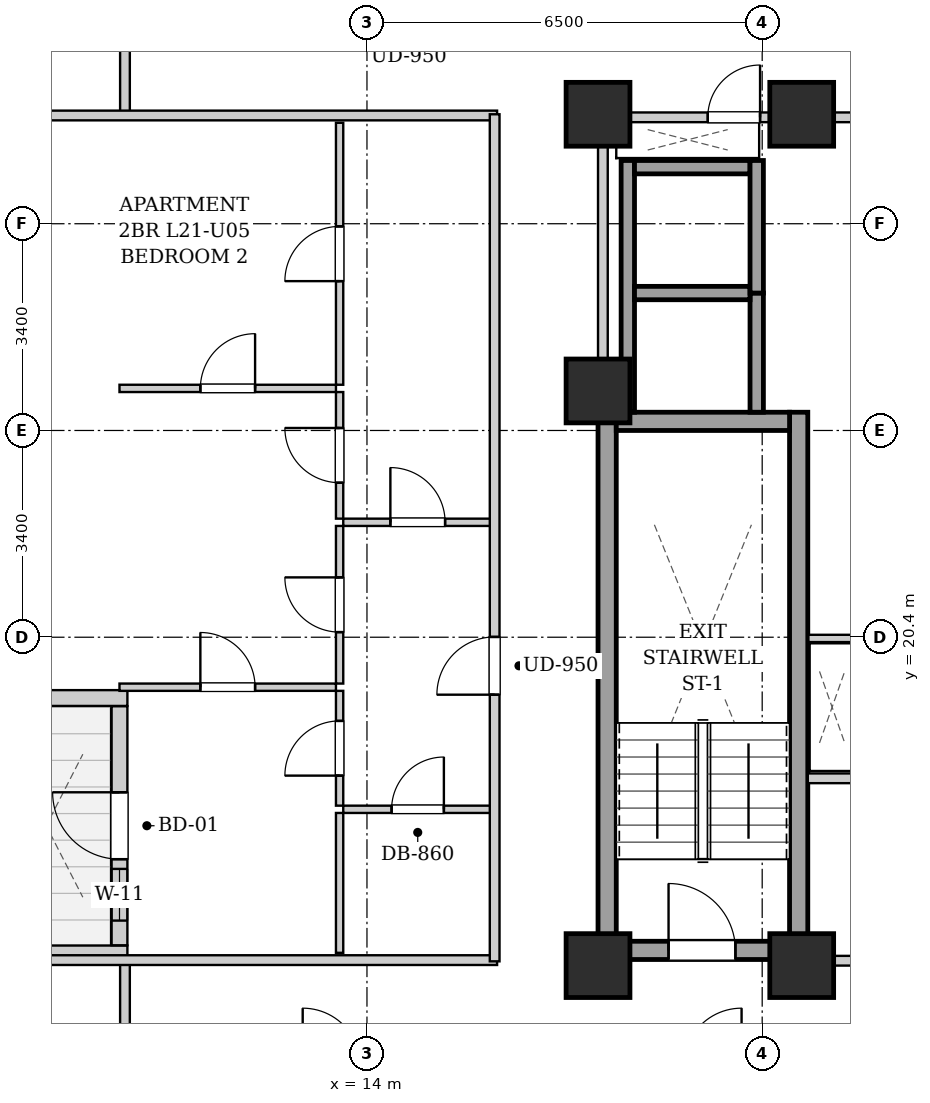
"""IFC4 building model, lengths in metres.
Left out: names, types, materials, properties, quantities, classifications, styles, units other than length and angle.
Written with IfcOpenShell. Run it as: python <this file> out.ifc"""

import sys

from ifc_helpers import new_model, si_unit, direction, frame, frame_2d, origin, origin_2d, place, context, subcontext, project, spatial, rectangle, extrude, element, fill, save


model = new_model("IFC4")
c1 = context("Model", 3, precision=1e-05, world=origin(), true_north=direction((0.0, 1.0)))
c2 = subcontext(c1, "Body", "Model", "MODEL_VIEW")
j1 = project(units=[si_unit("LENGTHUNIT", "METRE"), si_unit("PLANEANGLEUNIT", "RADIAN")], contexts=[c1])
p1 = place(None, origin())
s1 = spatial("IfcSite", under=j1, at=p1, CompositionType="ELEMENT")
p2 = place(p1, origin())
s2 = spatial("IfcBuilding", under=s1, at=p2, CompositionType="ELEMENT")
p3 = place(p2, frame((0.0, 0.0, 78.3)))
s3 = spatial("IfcBuildingStorey", under=s2, at=p3, CompositionType="ELEMENT", Elevation=78.3)
for number, where, z_axis, x_axis in (
    (1, (17.8, 15.0, 0.0), (0.0, 0.0, 1.0), (1.0, 0.0, 0.0)),
    (2, (21.15, 15.0, 0.0), (0.0, 0.0, 1.0), (1.0, 0.0, 0.0)),
    (3, (17.8, 29.0, 0.0), (0.0, 0.0, 1.0), (1.0, 0.0, 0.0)),
    (4, (21.15, 29.0, 0.0), (0.0, 0.0, 1.0), (1.0, 0.0, 0.0)),
    (5, (17.8, 24.45, 0.0), (0.0, 0.0, 1.0), (1.0, 0.0, 0.0)),
):
    element("IfcColumn", number, at=place(p3, frame(where, z_axis=z_axis, x_axis=x_axis)), inside=s3, PredefinedType="COLUMN", context=c2, shape_type="SweptSolid", body=[
        extrude(rectangle(XDim=1.05, YDim=1.05, at=origin_2d()), origin(), (0.0, 0.0, 1.0), 3.2),
    ])
p4 = place(p3, frame((7.66, 15.2, 0.0), z_axis=(0.0, 0.0, 1.0), x_axis=(1.0, 0.0, 0.0)))
e6 = element("IfcWall", 6, at=p4, inside=s3, PredefinedType="SOLIDWALL", context=c2, shape_type="SweptSolid", body=[
    extrude(rectangle(XDim=2.4, YDim=0.26, at=frame_2d((1.2, 0.0))), origin(), (0.0, 0.0, 1.0), 2.94),
])
p5 = place(p3, frame((9.93, 15.334, 0.0), z_axis=(0.0, 0.0, 1.0), x_axis=(0.0, 1.0, 0.0)))
e7 = element("IfcWall", 7, at=p5, inside=s3, PredefinedType="SOLIDWALL", context=c2, shape_type="SweptSolid", body=[
    extrude(rectangle(XDim=3.932, YDim=0.26, at=frame_2d((1.966, 0.0))), origin(), (0.0, 0.0, 1.0), 2.94),
])
p6 = place(p5, frame((1.416, 0.0, 0.0)))
e8 = element("IfcOpeningElement", 8, at=p6, cuts=e7, PredefinedType="OPENING", context=c2, shape_type="SweptSolid", body=[
    extrude(rectangle(XDim=1.1, YDim=2.0, at=frame_2d((0.55, 1.0))), frame((0.0, 0.14, 0.0), z_axis=(0.0, -1.0, 0.0), x_axis=(1.0, 0.0, 0.0)), (0.0, 0.0, 1.0), 0.28),
])
p7 = place(p5, frame((0.406, 0.0, 0.55)))
e9 = element("IfcOpeningElement", 9, at=p7, cuts=e7, PredefinedType="OPENING", context=c2, shape_type="SweptSolid", body=[
    extrude(rectangle(XDim=0.85, YDim=1.2, at=frame_2d((0.425, 0.6))), frame((0.0, 0.14, 0.0), z_axis=(0.0, -1.0, 0.0), x_axis=(1.0, 0.0, 0.0)), (0.0, 0.0, 1.0), 0.28),
])
p8 = place(p3, frame((10.06, 19.4, 0.0), z_axis=(0.0, 0.0, 1.0), x_axis=(-1.0, 0.0, 0.0)))
e10 = element("IfcWall", 10, at=p8, inside=s3, PredefinedType="SOLIDWALL", context=c2, shape_type="SweptSolid", body=[
    extrude(rectangle(XDim=2.4, YDim=0.26, at=frame_2d((1.2, 0.0))), origin(), (0.0, 0.0, 1.0), 2.94),
])
for number, where, z_axis, x_axis in (
    (11, (17.95, 15.1, 0.0), (0.0, 0.0, 1.0), (0.0, 1.0, 0.0)),
    (12, (21.1, 15.1, 0.0), (0.0, 0.0, 1.0), (0.0, 1.0, 0.0)),
):
    element("IfcWall", number, at=place(p3, frame(where, z_axis=z_axis, x_axis=x_axis)), inside=s3, PredefinedType="SHEAR", context=c2, shape_type="SweptSolid", body=[
        extrude(rectangle(XDim=9.0, YDim=0.3, at=frame_2d((4.5, 0.0))), origin(), (0.0, 0.0, 1.0), 2.94),
    ])
p9 = place(p3, frame((18.1, 23.95, 0.0), z_axis=(0.0, 0.0, 1.0), x_axis=(1.0, 0.0, 0.0)))
e13 = element("IfcWall", 13, at=p9, inside=s3, PredefinedType="SHEAR", context=c2, shape_type="SweptSolid", body=[
    extrude(rectangle(XDim=2.85, YDim=0.3, at=frame_2d((1.425, 0.0))), origin(), (0.0, 0.0, 1.0), 2.94),
])
p10 = place(p3, frame((18.1, 15.25, 0.0), z_axis=(0.0, 0.0, 1.0), x_axis=(1.0, 0.0, 0.0)))
e14 = element("IfcWall", 14, at=p10, inside=s3, PredefinedType="SHEAR", context=c2, shape_type="SweptSolid", body=[
    extrude(rectangle(XDim=2.85, YDim=0.3, at=frame_2d((1.425, 0.0))), origin(), (0.0, 0.0, 1.0), 2.94),
])
p11 = place(p10, frame((0.86, 0.0, 0.0)))
e15 = element("IfcOpeningElement", 15, at=p11, cuts=e14, PredefinedType="OPENING", context=c2, shape_type="SweptSolid", body=[
    extrude(rectangle(XDim=1.1, YDim=2.05, at=frame_2d((0.55, 1.025))), frame((0.0, 0.16, 0.0), z_axis=(0.0, -1.0, 0.0), x_axis=(1.0, 0.0, 0.0)), (0.0, 0.0, 1.0), 0.32),
])
p12 = place(p3, frame((18.29, 24.1, 0.0), z_axis=(0.0, 0.0, 1.0), x_axis=(0.0, 1.0, 0.0)))
e16 = element("IfcWall", 16, at=p12, inside=s3, PredefinedType="SHEAR", context=c2, shape_type="SweptSolid", body=[
    extrude(rectangle(XDim=4.14, YDim=0.22, at=frame_2d((2.07, 0.0))), origin(), (0.0, 0.0, 1.0), 2.94),
])
p13 = place(p3, frame((20.41, 24.1, 0.0), z_axis=(0.0, 0.0, 1.0), x_axis=(0.0, 1.0, 0.0)))
e17 = element("IfcWall", 17, at=p13, inside=s3, PredefinedType="SHEAR", context=c2, shape_type="SweptSolid", body=[
    extrude(rectangle(XDim=1.96, YDim=0.22, at=frame_2d((0.98, 0.0))), origin(), (0.0, 0.0, 1.0), 2.94),
])
for number, where, z_axis, x_axis in (
    (18, (18.4, 26.06, 0.0), (0.0, 0.0, 1.0), (1.0, 0.0, 0.0)),
    (19, (18.4, 28.13, 0.0), (0.0, 0.0, 1.0), (1.0, 0.0, 0.0)),
):
    element("IfcWall", number, at=place(p3, frame(where, z_axis=z_axis, x_axis=x_axis)), inside=s3, PredefinedType="SHEAR", context=c2, shape_type="SweptSolid", body=[
        extrude(rectangle(XDim=1.9, YDim=0.22, at=frame_2d((0.95, 0.0))), origin(), (0.0, 0.0, 1.0), 2.94),
    ])
p14 = place(p3, frame((20.41, 26.06, 0.0), z_axis=(0.0, 0.0, 1.0), x_axis=(0.0, 1.0, 0.0)))
e20 = element("IfcWall", 20, at=p14, inside=s3, PredefinedType="SHEAR", context=c2, shape_type="SweptSolid", body=[
    extrude(rectangle(XDim=2.18, YDim=0.22, at=frame_2d((1.09, 0.0))), origin(), (0.0, 0.0, 1.0), 2.94),
])
p15 = place(p3, frame((21.25, 15.08, 0.0), z_axis=(0.0, 0.0, 1.0), x_axis=(1.0, 0.0, 0.0)))
e21 = element("IfcWall", 21, at=p15, inside=s3, PredefinedType="PARTITIONING", context=c2, shape_type="SweptSolid", body=[
    extrude(rectangle(XDim=8.5, YDim=0.16, at=frame_2d((4.25, 0.0))), origin(), (0.0, 0.0, 1.0), 2.309),
])
p16 = place(p15, frame((3.725, 0.0, 0.0)))
e22 = element("IfcOpeningElement", 22, at=p16, cuts=e21, PredefinedType="OPENING", context=c2, shape_type="SweptSolid", body=[
    extrude(rectangle(XDim=1.05, YDim=2.05, at=frame_2d((0.525, 1.025))), frame((0.0, 0.09, 0.0), z_axis=(0.0, -1.0, 0.0), x_axis=(1.0, 0.0, 0.0)), (0.0, 0.0, 1.0), 0.18),
])
p17 = place(p3, frame((21.25, 18.08, 0.0), z_axis=(0.0, 0.0, 1.0), x_axis=(1.0, 0.0, 0.0)))
e23 = element("IfcWall", 23, at=p17, inside=s3, PredefinedType="PARTITIONING", context=c2, shape_type="SweptSolid", body=[
    extrude(rectangle(XDim=1.1, YDim=0.16, at=frame_2d((0.55, 0.0))), origin(), (0.0, 0.0, 1.0), 2.94),
])
p18 = place(p3, frame((17.88, 24.12, 0.0), z_axis=(0.0, 0.0, 1.0), x_axis=(0.0, 1.0, 0.0)))
e24 = element("IfcWall", 24, at=p18, inside=s3, PredefinedType="PARTITIONING", context=c2, shape_type="SweptSolid", body=[
    extrude(rectangle(XDim=4.76, YDim=0.16, at=frame_2d((2.38, 0.0))), origin(), (0.0, 0.0, 1.0), 2.275),
])
p19 = place(p3, frame((17.96, 28.95, 0.0), z_axis=(0.0, 0.0, 1.0), x_axis=(1.0, 0.0, 0.0)))
e25 = element("IfcWall", 25, at=p19, inside=s3, PredefinedType="PARTITIONING", context=c2, shape_type="SweptSolid", body=[
    extrude(rectangle(XDim=4.29, YDim=0.16, at=frame_2d((2.145, 0.0))), origin(), (0.0, 0.0, 1.0), 2.309),
])
p20 = place(p19, frame((1.645, 0.0, 0.0)))
e26 = element("IfcOpeningElement", 26, at=p20, cuts=e25, PredefinedType="OPENING", context=c2, shape_type="SweptSolid", body=[
    extrude(rectangle(XDim=0.86, YDim=2.05, at=frame_2d((0.43, 1.025))), frame((0.0, 0.09, 0.0), z_axis=(0.0, -1.0, 0.0), x_axis=(1.0, 0.0, 0.0)), (0.0, 0.0, 1.0), 0.18),
])
p21 = place(p3, frame((22.28, 20.38, 0.0), z_axis=(0.0, 0.0, 1.0), x_axis=(-1.0, 0.0, 0.0)))
e27 = element("IfcWall", 27, at=p21, inside=s3, PredefinedType="PARTITIONING", context=c2, shape_type="SweptSolid", body=[
    extrude(rectangle(XDim=1.02, YDim=0.12, at=frame_2d((0.51, 0.0))), origin(), (0.0, 0.0, 1.0), 2.94),
])
for number, where, z_axis, x_axis in (
    (28, (10.02, 13.35, 0.0), (0.0, 0.0, 1.0), (0.0, 1.0, 0.0)),
    (29, (10.02, 28.98, 0.0), (0.0, 0.0, 1.0), (0.0, 1.0, 0.0)),
):
    element("IfcWall", number, at=place(p3, frame(where, z_axis=z_axis, x_axis=x_axis)), inside=s3, PredefinedType="PARTITIONING", context=c2, shape_type="SweptSolid", body=[
        extrude(rectangle(XDim=1.74, YDim=0.16, at=frame_2d((0.87, 0.0))), origin(), (0.0, 0.0, 1.0), 2.94),
    ])
for number, where, z_axis, x_axis in (
    (30, (7.78, 15.09, 0.0), (0.0, 0.0, 1.0), (1.0, 0.0, 0.0)),
    (31, (7.78, 28.98, 0.0), (0.0, 0.0, 1.0), (1.0, 0.0, 0.0)),
):
    element("IfcWall", number, at=place(p3, frame(where, z_axis=z_axis, x_axis=x_axis)), inside=s3, PredefinedType="PARTITIONING", context=c2, shape_type="SweptSolid", body=[
        extrude(rectangle(XDim=8.36, YDim=0.16, at=frame_2d((4.18, 0.0))), origin(), (0.0, 0.0, 1.0), 2.309),
    ])
p22 = place(p3, frame((13.61, 22.29, 0.0), z_axis=(0.0, 0.0, 1.0), x_axis=(1.0, 0.0, 0.0)))
e32 = element("IfcWall", 32, at=p22, inside=s3, PredefinedType="PARTITIONING", context=c2, shape_type="SweptSolid", body=[
    extrude(rectangle(XDim=2.45, YDim=0.12, at=frame_2d((1.225, 0.0))), origin(), (0.0, 0.0, 1.0), 2.94),
])
p23 = place(p22, frame((0.775, 0.0, 0.0)))
e33 = element("IfcOpeningElement", 33, at=p23, cuts=e32, PredefinedType="OPENING", context=c2, shape_type="SweptSolid", body=[
    extrude(rectangle(XDim=0.9, YDim=2.05, at=frame_2d((0.45, 1.025))), frame((0.0, 0.07, 0.0), z_axis=(0.0, -1.0, 0.0), x_axis=(1.0, 0.0, 0.0)), (0.0, 0.0, 1.0), 0.14),
])
p24 = place(p3, frame((13.55, 22.35, 0.0), z_axis=(0.0, 0.0, 1.0), x_axis=(0.0, 1.0, 0.0)))
e34 = element("IfcWall", 34, at=p24, inside=s3, PredefinedType="PARTITIONING", context=c2, shape_type="SweptSolid", body=[
    extrude(rectangle(XDim=2.082, YDim=0.12, at=frame_2d((1.041, 0.0))), origin(), (0.0, 0.0, 1.0), 2.94),
])
p25 = place(p24, frame((0.591, 0.0, 0.0)))
e35 = element("IfcOpeningElement", 35, at=p25, cuts=e34, PredefinedType="OPENING", context=c2, shape_type="SweptSolid", body=[
    extrude(rectangle(XDim=0.9, YDim=2.05, at=frame_2d((0.45, 1.025))), frame((0.0, 0.07, 0.0), z_axis=(0.0, -1.0, 0.0), x_axis=(1.0, 0.0, 0.0)), (0.0, 0.0, 1.0), 0.14),
])
p26 = place(p3, frame((13.55, 24.552, 0.0), z_axis=(0.0, 0.0, 1.0), x_axis=(0.0, 1.0, 0.0)))
e36 = element("IfcWall", 36, at=p26, inside=s3, PredefinedType="PARTITIONING", context=c2, shape_type="SweptSolid", body=[
    extrude(rectangle(XDim=4.308, YDim=0.12, at=frame_2d((2.154, 0.0))), origin(), (0.0, 0.0, 1.0), 2.94),
])
p27 = place(p26, frame((1.704, 0.0, 0.0)))
e37 = element("IfcOpeningElement", 37, at=p27, cuts=e36, PredefinedType="OPENING", context=c2, shape_type="SweptSolid", body=[
    extrude(rectangle(XDim=0.9, YDim=2.05, at=frame_2d((0.45, 1.025))), frame((0.0, 0.07, 0.0), z_axis=(0.0, -1.0, 0.0), x_axis=(1.0, 0.0, 0.0)), (0.0, 0.0, 1.0), 0.14),
])
p28 = place(p3, frame((13.61, 17.57, 0.0), z_axis=(0.0, 0.0, 1.0), x_axis=(1.0, 0.0, 0.0)))
e38 = element("IfcWall", 38, at=p28, inside=s3, PredefinedType="PARTITIONING", context=c2, shape_type="SweptSolid", body=[
    extrude(rectangle(XDim=2.45, YDim=0.12, at=frame_2d((1.225, 0.0))), origin(), (0.0, 0.0, 1.0), 2.94),
])
p29 = place(p28, frame((0.795, 0.0, 0.0)))
e39 = element("IfcOpeningElement", 39, at=p29, cuts=e38, PredefinedType="OPENING", context=c2, shape_type="SweptSolid", body=[
    extrude(rectangle(XDim=0.86, YDim=2.05, at=frame_2d((0.43, 1.025))), frame((0.0, 0.07, 0.0), z_axis=(0.0, -1.0, 0.0), x_axis=(1.0, 0.0, 0.0)), (0.0, 0.0, 1.0), 0.14),
])
p30 = place(p3, frame((13.55, 15.21, 0.0), z_axis=(0.0, 0.0, 1.0), x_axis=(0.0, 1.0, 0.0)))
e40 = element("IfcWall", 40, at=p30, inside=s3, PredefinedType="PARTITIONING", context=c2, shape_type="SweptSolid", body=[
    extrude(rectangle(XDim=2.3, YDim=0.12, at=frame_2d((1.15, 0.0))), origin(), (0.0, 0.0, 1.0), 2.94),
])
p31 = place(p3, frame((13.55, 17.63, 0.0), z_axis=(0.0, 0.0, 1.0), x_axis=(0.0, 1.0, 0.0)))
e41 = element("IfcWall", 41, at=p31, inside=s3, PredefinedType="PARTITIONING", context=c2, shape_type="SweptSolid", body=[
    extrude(rectangle(XDim=1.888, YDim=0.12, at=frame_2d((0.944, 0.0))), origin(), (0.0, 0.0, 1.0), 2.94),
])
p32 = place(p31, frame((0.494, 0.0, 0.0)))
e42 = element("IfcOpeningElement", 42, at=p32, cuts=e41, PredefinedType="OPENING", context=c2, shape_type="SweptSolid", body=[
    extrude(rectangle(XDim=0.9, YDim=2.05, at=frame_2d((0.45, 1.025))), frame((0.0, 0.07, 0.0), z_axis=(0.0, -1.0, 0.0), x_axis=(1.0, 0.0, 0.0)), (0.0, 0.0, 1.0), 0.14),
])
p33 = place(p3, frame((13.55, 19.638, 0.0), z_axis=(0.0, 0.0, 1.0), x_axis=(0.0, 1.0, 0.0)))
e43 = element("IfcWall", 43, at=p33, inside=s3, PredefinedType="PARTITIONING", context=c2, shape_type="SweptSolid", body=[
    extrude(rectangle(XDim=2.592, YDim=0.12, at=frame_2d((1.296, 0.0))), origin(), (0.0, 0.0, 1.0), 2.94),
])
p34 = place(p33, frame((0.846, 0.0, 0.0)))
e44 = element("IfcOpeningElement", 44, at=p34, cuts=e43, PredefinedType="OPENING", context=c2, shape_type="SweptSolid", body=[
    extrude(rectangle(XDim=0.9, YDim=2.05, at=frame_2d((0.45, 1.025))), frame((0.0, 0.07, 0.0), z_axis=(0.0, -1.0, 0.0), x_axis=(1.0, 0.0, 0.0)), (0.0, 0.0, 1.0), 0.14),
])
p35 = place(p3, frame((9.93, 19.578, 0.0), z_axis=(0.0, 0.0, 1.0), x_axis=(1.0, 0.0, 0.0)))
e45 = element("IfcWall", 45, at=p35, inside=s3, PredefinedType="PARTITIONING", context=c2, shape_type="SweptSolid", body=[
    extrude(rectangle(XDim=3.56, YDim=0.12, at=frame_2d((1.78, 0.0))), origin(), (0.0, 0.0, 1.0), 2.94),
])
p36 = place(p35, frame((1.33, 0.0, 0.0)))
e46 = element("IfcOpeningElement", 46, at=p36, cuts=e45, PredefinedType="OPENING", context=c2, shape_type="SweptSolid", body=[
    extrude(rectangle(XDim=0.9, YDim=2.05, at=frame_2d((0.45, 1.025))), frame((0.0, 0.07, 0.0), z_axis=(0.0, -1.0, 0.0), x_axis=(1.0, 0.0, 0.0)), (0.0, 0.0, 1.0), 0.14),
])
p37 = place(p3, frame((9.93, 24.492, 0.0), z_axis=(0.0, 0.0, 1.0), x_axis=(1.0, 0.0, 0.0)))
e47 = element("IfcWall", 47, at=p37, inside=s3, PredefinedType="PARTITIONING", context=c2, shape_type="SweptSolid", body=[
    extrude(rectangle(XDim=3.56, YDim=0.12, at=frame_2d((1.78, 0.0))), origin(), (0.0, 0.0, 1.0), 2.518),
])
p38 = place(p37, frame((1.33, 0.0, 0.0)))
e48 = element("IfcOpeningElement", 48, at=p38, cuts=e47, PredefinedType="OPENING", context=c2, shape_type="SweptSolid", body=[
    extrude(rectangle(XDim=0.9, YDim=2.05, at=frame_2d((0.45, 1.025))), frame((0.0, 0.07, 0.0), z_axis=(0.0, -1.0, 0.0), x_axis=(1.0, 0.0, 0.0)), (0.0, 0.0, 1.0), 0.14),
])
p39 = place(p3, frame((16.1, 15.07, 0.0), z_axis=(0.0, 0.0, 1.0), x_axis=(0.0, 1.0, 0.0)))
e49 = element("IfcWall", 49, at=p39, inside=s3, PredefinedType="PARTITIONING", context=c2, shape_type="SweptSolid", body=[
    extrude(rectangle(XDim=13.93, YDim=0.16, at=frame_2d((6.965, 0.0))), origin(), (0.0, 0.0, 1.0), 2.94),
])
p40 = place(p39, frame((4.385, 0.0, 0.0)))
e50 = element("IfcOpeningElement", 50, at=p40, cuts=e49, PredefinedType="OPENING", context=c2, shape_type="SweptSolid", body=[
    extrude(rectangle(XDim=0.95, YDim=2.1, at=frame_2d((0.475, 1.05))), frame((0.0, 0.09, 0.0), z_axis=(0.0, -1.0, 0.0), x_axis=(1.0, 0.0, 0.0)), (0.0, 0.0, 1.0), 0.18),
])
p41 = place(p11, origin())
e51 = element("IfcDoor", 51, at=p41, inside=s3, OperationType="SINGLE_SWING_LEFT", PredefinedType="DOOR", context=c2, shape_type="SweptSolid", body=[
    extrude(rectangle(XDim=1.1, YDim=2.05, at=frame_2d((0.55, 1.025))), frame((0.0, 0.025, 0.0), z_axis=(0.0, -1.0, 0.0), x_axis=(1.0, 0.0, 0.0)), (0.0, 0.0, 1.0), 0.05),
])
fill(e15, e51)
p42 = place(p20, origin())
e52 = element("IfcDoor", 52, at=p42, inside=s3, OperationType="SINGLE_SWING_RIGHT", PredefinedType="DOOR", context=c2, shape_type="SweptSolid", body=[
    extrude(rectangle(XDim=0.86, YDim=2.05, at=frame_2d((0.43, 1.025))), frame((0.0, 0.025, 0.0), z_axis=(0.0, -1.0, 0.0), x_axis=(1.0, 0.0, 0.0)), (0.0, 0.0, 1.0), 0.05),
])
fill(e26, e52)
p43 = place(p23, origin())
e53 = element("IfcDoor", 53, at=p43, inside=s3, OperationType="SINGLE_SWING_LEFT", PredefinedType="DOOR", context=c2, shape_type="SweptSolid", body=[
    extrude(rectangle(XDim=0.9, YDim=2.05, at=frame_2d((0.45, 1.025))), frame((0.0, 0.025, 0.0), z_axis=(0.0, -1.0, 0.0), x_axis=(1.0, 0.0, 0.0)), (0.0, 0.0, 1.0), 0.05),
])
fill(e33, e53)
p44 = place(p25, origin())
e54 = element("IfcDoor", 54, at=p44, inside=s3, OperationType="SINGLE_SWING_RIGHT", PredefinedType="DOOR", context=c2, shape_type="SweptSolid", body=[
    extrude(rectangle(XDim=0.9, YDim=2.05, at=frame_2d((0.45, 1.025))), frame((0.0, 0.025, 0.0), z_axis=(0.0, -1.0, 0.0), x_axis=(1.0, 0.0, 0.0)), (0.0, 0.0, 1.0), 0.05),
])
fill(e35, e54)
p45 = place(p27, origin())
e55 = element("IfcDoor", 55, at=p45, inside=s3, OperationType="SINGLE_SWING_LEFT", PredefinedType="DOOR", context=c2, shape_type="SweptSolid", body=[
    extrude(rectangle(XDim=0.9, YDim=2.05, at=frame_2d((0.45, 1.025))), frame((0.0, 0.025, 0.0), z_axis=(0.0, -1.0, 0.0), x_axis=(1.0, 0.0, 0.0)), (0.0, 0.0, 1.0), 0.05),
])
fill(e37, e55)
p46 = place(p29, origin())
e56 = element("IfcDoor", 56, at=p46, inside=s3, OperationType="SINGLE_SWING_RIGHT", PredefinedType="DOOR", context=c2, shape_type="SweptSolid", body=[
    extrude(rectangle(XDim=0.86, YDim=2.05, at=frame_2d((0.43, 1.025))), frame((0.0, 0.025, 0.0), z_axis=(0.0, -1.0, 0.0), x_axis=(1.0, 0.0, 0.0)), (0.0, 0.0, 1.0), 0.05),
])
fill(e39, e56)
p47 = place(p32, origin())
e57 = element("IfcDoor", 57, at=p47, inside=s3, OperationType="SINGLE_SWING_LEFT", PredefinedType="DOOR", context=c2, shape_type="SweptSolid", body=[
    extrude(rectangle(XDim=0.9, YDim=2.05, at=frame_2d((0.45, 1.025))), frame((0.0, 0.025, 0.0), z_axis=(0.0, -1.0, 0.0), x_axis=(1.0, 0.0, 0.0)), (0.0, 0.0, 1.0), 0.05),
])
fill(e42, e57)
p48 = place(p34, origin())
e58 = element("IfcDoor", 58, at=p48, inside=s3, OperationType="SINGLE_SWING_RIGHT", PredefinedType="DOOR", context=c2, shape_type="SweptSolid", body=[
    extrude(rectangle(XDim=0.9, YDim=2.05, at=frame_2d((0.45, 1.025))), frame((0.0, 0.025, 0.0), z_axis=(0.0, -1.0, 0.0), x_axis=(1.0, 0.0, 0.0)), (0.0, 0.0, 1.0), 0.05),
])
fill(e44, e58)
p49 = place(p36, origin())
e59 = element("IfcDoor", 59, at=p49, inside=s3, OperationType="SINGLE_SWING_LEFT", PredefinedType="DOOR", context=c2, shape_type="SweptSolid", body=[
    extrude(rectangle(XDim=0.9, YDim=2.05, at=frame_2d((0.45, 1.025))), frame((0.0, 0.025, 0.0), z_axis=(0.0, -1.0, 0.0), x_axis=(1.0, 0.0, 0.0)), (0.0, 0.0, 1.0), 0.05),
])
fill(e46, e59)
p50 = place(p38, origin())
e60 = element("IfcDoor", 60, at=p50, inside=s3, OperationType="SINGLE_SWING_RIGHT", PredefinedType="DOOR", context=c2, shape_type="SweptSolid", body=[
    extrude(rectangle(XDim=0.9, YDim=2.05, at=frame_2d((0.45, 1.025))), frame((0.0, 0.025, 0.0), z_axis=(0.0, -1.0, 0.0), x_axis=(1.0, 0.0, 0.0)), (0.0, 0.0, 1.0), 0.05),
])
fill(e48, e60)
p51 = place(p40, origin())
e61 = element("IfcDoor", 61, at=p51, inside=s3, OperationType="SINGLE_SWING_LEFT", PredefinedType="DOOR", context=c2, shape_type="SweptSolid", body=[
    extrude(rectangle(XDim=0.95, YDim=2.1, at=frame_2d((0.475, 1.05))), frame((0.0, 0.025, 0.0), z_axis=(0.0, -1.0, 0.0), x_axis=(1.0, 0.0, 0.0)), (0.0, 0.0, 1.0), 0.05),
])
fill(e50, e61)
p52 = place(p6, origin())
e62 = element("IfcDoor", 62, at=p52, inside=s3, OperationType="SINGLE_SWING_RIGHT", PredefinedType="DOOR", context=c2, shape_type="SweptSolid", body=[
    extrude(rectangle(XDim=1.1, YDim=2.0, at=frame_2d((0.55, 1.0))), frame((0.0, 0.025, 0.0), z_axis=(0.0, -1.0, 0.0), x_axis=(1.0, 0.0, 0.0)), (0.0, 0.0, 1.0), 0.05),
])
fill(e8, e62)
p53 = place(p7, origin())
e63 = element("IfcWindow", 63, at=p53, inside=s3, PartitioningType="SINGLE_PANEL", PredefinedType="WINDOW", context=c2, shape_type="SweptSolid", body=[
    extrude(rectangle(XDim=0.85, YDim=1.2, at=frame_2d((0.425, 0.6))), frame((0.0, 0.03, 0.0), z_axis=(0.0, -1.0, 0.0), x_axis=(1.0, 0.0, 0.0)), (0.0, 0.0, 1.0), 0.06),
])
fill(e9, e63)
save(model, sys.argv[1])
